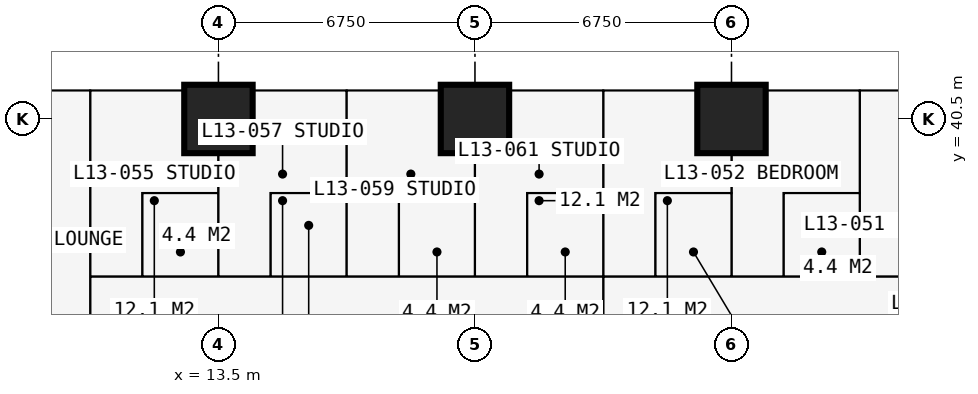
"""IFC4 building model, lengths in metres.
Left out: names, types, materials, properties, quantities, classifications, styles, units other than length and angle.
Written with IfcOpenShell. Run it as: python <this file> out.ifc"""

import sys

from ifc_helpers import new_model, si_unit, direction, frame, frame_2d, origin, origin_2d, place, context, subcontext, project, spatial, rectangle, extrude, element, fill, save


model = new_model("IFC4")
c1 = context("Model", 3, precision=1e-05, world=origin(), true_north=direction((0.0, 1.0)))
c2 = subcontext(c1, "Body", "Model", "MODEL_VIEW")
j1 = project(units=[si_unit("LENGTHUNIT", "METRE"), si_unit("PLANEANGLEUNIT", "RADIAN")], contexts=[c1])
p1 = place(None, origin())
s1 = spatial("IfcSite", under=j1, at=p1, CompositionType="ELEMENT")
p2 = place(p1, origin())
s2 = spatial("IfcBuilding", under=s1, at=p2, CompositionType="ELEMENT")
p3 = place(p2, frame((0.0, 0.0, 50.4)))
s3 = spatial("IfcBuildingStorey", under=s2, at=p3, CompositionType="ELEMENT", Elevation=50.4)
for number, where, z_axis, x_axis in (
    (1, (13.5, 40.5, 0.0), (0.0, 0.0, 1.0), (1.0, 0.0, 0.0)),
    (2, (20.25, 40.5, 0.0), (0.0, 0.0, 1.0), (1.0, 0.0, 0.0)),
    (3, (27.0, 40.5, 0.0), (0.0, 0.0, 1.0), (1.0, 0.0, 0.0)),
):
    element("IfcColumn", number, at=place(p3, frame(where, z_axis=z_axis, x_axis=x_axis)), inside=s3, PredefinedType="COLUMN", context=c2, shape_type="SweptSolid", body=[
        extrude(rectangle(XDim=1.8, YDim=1.8, at=origin_2d()), origin(), (0.0, 0.0, 1.0), 3.6),
    ])
p4 = place(p3, frame((20.25, 41.25, 0.0), z_axis=(0.0, 0.0, 1.0), x_axis=(1.0, 0.0, 0.0)))
e4 = element("IfcWall", 4, at=p4, inside=s3, PredefinedType="SOLIDWALL", context=c2, shape_type="SweptSolid", body=[
    extrude(rectangle(XDim=6.75, YDim=0.15, at=frame_2d((3.375, 0.0))), origin(), (0.0, 0.0, 1.0), 3.375),
])
p5 = place(p4, frame((0.962, 0.0, 0.0)))
e5 = element("IfcOpeningElement", 5, at=p5, cuts=e4, PredefinedType="OPENING", context=c2, shape_type="SweptSolid", body=[
    extrude(rectangle(XDim=1.0, YDim=2.2, at=frame_2d((0.5, 1.1))), frame((0.0, 0.085, 0.0), z_axis=(0.0, -1.0, 0.0), x_axis=(1.0, 0.0, 0.0)), (0.0, 0.0, 1.0), 0.17),
])
p6 = place(p4, frame((2.025, 0.0, 0.9)))
e6 = element("IfcOpeningElement", 6, at=p6, cuts=e4, PredefinedType="OPENING", context=c2, shape_type="SweptSolid", body=[
    extrude(rectangle(XDim=1.2, YDim=1.8, at=frame_2d((0.6, 0.9))), frame((0.0, 0.085, 0.0), z_axis=(0.0, -1.0, 0.0), x_axis=(1.0, 0.0, 0.0)), (0.0, 0.0, 1.0), 0.17),
])
p7 = place(p4, frame((4.788, 0.0, 0.0)))
e7 = element("IfcOpeningElement", 7, at=p7, cuts=e4, PredefinedType="OPENING", context=c2, shape_type="SweptSolid", body=[
    extrude(rectangle(XDim=1.0, YDim=2.2, at=frame_2d((0.5, 1.1))), frame((0.0, 0.085, 0.0), z_axis=(0.0, -1.0, 0.0), x_axis=(1.0, 0.0, 0.0)), (0.0, 0.0, 1.0), 0.17),
])
p8 = place(p4, frame((3.525, 0.0, 0.9)))
e8 = element("IfcOpeningElement", 8, at=p8, cuts=e4, PredefinedType="OPENING", context=c2, shape_type="SweptSolid", body=[
    extrude(rectangle(XDim=1.2, YDim=1.8, at=frame_2d((0.6, 0.9))), frame((0.0, 0.085, 0.0), z_axis=(0.0, -1.0, 0.0), x_axis=(1.0, 0.0, 0.0)), (0.0, 0.0, 1.0), 0.17),
])
p9 = place(p3, frame((23.625, 41.35, 0.0), z_axis=(0.0, 0.0, 1.0), x_axis=(0.0, 1.0, 0.0)))
e9 = element("IfcWall", 9, at=p9, inside=s3, PredefinedType="USERDEFINED", context=c2, shape_type="SweptSolid", body=[
    extrude(rectangle(XDim=2.2, YDim=1.0, at=frame_2d((1.1, 0.0))), origin(), (0.0, 0.0, 1.0), 0.9),
])
p10 = place(p3, frame((10.125, 30.375, 0.0), z_axis=(0.0, 0.0, 1.0), x_axis=(0.0, 1.0, 0.0)))
e10 = element("IfcWall", 10, at=p10, inside=s3, PredefinedType="PARTITIONING", context=c2, shape_type="SweptSolid", body=[
    extrude(rectangle(XDim=10.859, YDim=0.15, at=frame_2d((5.429, 0.0))), origin(), (0.0, 0.0, 1.0), 3.375),
])
p11 = place(p10, frame((4.725, 0.0, 0.0)))
e11 = element("IfcOpeningElement", 11, at=p11, cuts=e10, PredefinedType="OPENING", context=c2, shape_type="SweptSolid", body=[
    extrude(rectangle(XDim=1.0, YDim=2.2, at=frame_2d((0.5, 1.1))), frame((0.0, 0.085, 0.0), z_axis=(0.0, -1.0, 0.0), x_axis=(1.0, 0.0, 0.0)), (0.0, 0.0, 1.0), 0.17),
])
p12 = place(p3, frame((10.125, 36.35, 0.0), z_axis=(0.0, 0.0, 1.0), x_axis=(1.0, 0.0, 0.0)))
e12 = element("IfcWall", 12, at=p12, inside=s3, PredefinedType="PARTITIONING", context=c2, shape_type="SweptSolid", body=[
    extrude(rectangle(XDim=23.625, YDim=0.1, at=frame_2d((11.812, 0.0))), origin(), (0.0, 0.0, 1.0), 3.375),
])
p13 = place(p12, frame((21.45, 0.0, 0.0)))
e13 = element("IfcOpeningElement", 13, at=p13, cuts=e12, PredefinedType="OPENING", context=c2, shape_type="SweptSolid", body=[
    extrude(rectangle(XDim=1.0, YDim=2.2, at=frame_2d((0.5, 1.1))), frame((0.0, 0.06, 0.0), z_axis=(0.0, -1.0, 0.0), x_axis=(1.0, 0.0, 0.0)), (0.0, 0.0, 1.0), 0.12),
])
p14 = place(p12, frame((17.125, 0.0, 0.0)))
e14 = element("IfcOpeningElement", 14, at=p14, cuts=e12, PredefinedType="OPENING", context=c2, shape_type="SweptSolid", body=[
    extrude(rectangle(XDim=0.95, YDim=2.2, at=frame_2d((0.475, 1.1))), frame((0.0, 0.06, 0.0), z_axis=(0.0, -1.0, 0.0), x_axis=(1.0, 0.0, 0.0)), (0.0, 0.0, 1.0), 0.12),
])
p15 = place(p12, frame((13.7, 0.0, 0.0)))
e15 = element("IfcOpeningElement", 15, at=p15, cuts=e12, PredefinedType="OPENING", context=c2, shape_type="SweptSolid", body=[
    extrude(rectangle(XDim=0.95, YDim=2.2, at=frame_2d((0.475, 1.1))), frame((0.0, 0.06, 0.0), z_axis=(0.0, -1.0, 0.0), x_axis=(1.0, 0.0, 0.0)), (0.0, 0.0, 1.0), 0.12),
])
p16 = place(p12, frame((0.2, 0.0, 0.0)))
e16 = element("IfcOpeningElement", 16, at=p16, cuts=e12, PredefinedType="OPENING", context=c2, shape_type="SweptSolid", body=[
    extrude(rectangle(XDim=0.95, YDim=2.2, at=frame_2d((0.475, 1.1))), frame((0.0, 0.06, 0.0), z_axis=(0.0, -1.0, 0.0), x_axis=(1.0, 0.0, 0.0)), (0.0, 0.0, 1.0), 0.12),
])
p17 = place(p12, frame((3.625, 0.0, 0.0)))
e17 = element("IfcOpeningElement", 17, at=p17, cuts=e12, PredefinedType="OPENING", context=c2, shape_type="SweptSolid", body=[
    extrude(rectangle(XDim=0.95, YDim=2.2, at=frame_2d((0.475, 1.1))), frame((0.0, 0.06, 0.0), z_axis=(0.0, -1.0, 0.0), x_axis=(1.0, 0.0, 0.0)), (0.0, 0.0, 1.0), 0.12),
])
p18 = place(p12, frame((7.0, 0.0, 0.0)))
e18 = element("IfcOpeningElement", 18, at=p18, cuts=e12, PredefinedType="OPENING", context=c2, shape_type="SweptSolid", body=[
    extrude(rectangle(XDim=0.95, YDim=2.2, at=frame_2d((0.475, 1.1))), frame((0.0, 0.06, 0.0), z_axis=(0.0, -1.0, 0.0), x_axis=(1.0, 0.0, 0.0)), (0.0, 0.0, 1.0), 0.12),
])
p19 = place(p12, frame((10.375, 0.0, 0.0)))
e19 = element("IfcOpeningElement", 19, at=p19, cuts=e12, PredefinedType="OPENING", context=c2, shape_type="SweptSolid", body=[
    extrude(rectangle(XDim=0.95, YDim=2.2, at=frame_2d((0.475, 1.1))), frame((0.0, 0.06, 0.0), z_axis=(0.0, -1.0, 0.0), x_axis=(1.0, 0.0, 0.0)), (0.0, 0.0, 1.0), 0.12),
])
p20 = place(p3, frame((11.5, 36.35, 0.0), z_axis=(0.0, 0.0, 1.0), x_axis=(0.0, 1.0, 0.0)))
e20 = element("IfcWall", 20, at=p20, inside=s3, PredefinedType="PARTITIONING", context=c2, shape_type="SweptSolid", body=[
    extrude(rectangle(XDim=2.2, YDim=0.1, at=frame_2d((1.1, 0.0))), origin(), (0.0, 0.0, 1.0), 3.375),
])
p21 = place(p20, frame((0.65, 0.0, 0.0)))
e21 = element("IfcOpeningElement", 21, at=p21, cuts=e20, PredefinedType="OPENING", context=c2, shape_type="SweptSolid", body=[
    extrude(rectangle(XDim=0.9, YDim=2.2, at=frame_2d((0.45, 1.1))), frame((0.0, 0.06, 0.0), z_axis=(0.0, -1.0, 0.0), x_axis=(1.0, 0.0, 0.0)), (0.0, 0.0, 1.0), 0.12),
])
p22 = place(p3, frame((11.5, 38.55, 0.0), z_axis=(0.0, 0.0, 1.0), x_axis=(1.0, 0.0, 0.0)))
e22 = element("IfcWall", 22, at=p22, inside=s3, PredefinedType="PARTITIONING", context=c2, shape_type="SweptSolid", body=[
    extrude(rectangle(XDim=2.0, YDim=0.1, at=frame_2d((1.0, 0.0))), origin(), (0.0, 0.0, 1.0), 3.375),
])
p23 = place(p3, frame((13.5, 36.35, 0.0), z_axis=(0.0, 0.0, 1.0), x_axis=(0.0, 1.0, 0.0)))
e23 = element("IfcWall", 23, at=p23, inside=s3, PredefinedType="PARTITIONING", context=c2, shape_type="SweptSolid", body=[
    extrude(rectangle(XDim=4.884, YDim=0.175, at=frame_2d((2.442, 0.0))), origin(), (0.0, 0.0, 1.0), 2.61),
])
p24 = place(p3, frame((14.875, 36.35, 0.0), z_axis=(0.0, 0.0, 1.0), x_axis=(0.0, 1.0, 0.0)))
e24 = element("IfcWall", 24, at=p24, inside=s3, PredefinedType="PARTITIONING", context=c2, shape_type="SweptSolid", body=[
    extrude(rectangle(XDim=2.2, YDim=0.1, at=frame_2d((1.1, 0.0))), origin(), (0.0, 0.0, 1.0), 3.375),
])
p25 = place(p24, frame((0.65, 0.0, 0.0)))
e25 = element("IfcOpeningElement", 25, at=p25, cuts=e24, PredefinedType="OPENING", context=c2, shape_type="SweptSolid", body=[
    extrude(rectangle(XDim=0.9, YDim=2.2, at=frame_2d((0.45, 1.1))), frame((0.0, 0.06, 0.0), z_axis=(0.0, -1.0, 0.0), x_axis=(1.0, 0.0, 0.0)), (0.0, 0.0, 1.0), 0.12),
])
p26 = place(p3, frame((14.875, 38.55, 0.0), z_axis=(0.0, 0.0, 1.0), x_axis=(1.0, 0.0, 0.0)))
e26 = element("IfcWall", 26, at=p26, inside=s3, PredefinedType="PARTITIONING", context=c2, shape_type="SweptSolid", body=[
    extrude(rectangle(XDim=2.0, YDim=0.1, at=frame_2d((1.0, 0.0))), origin(), (0.0, 0.0, 1.0), 3.375),
])
p27 = place(p3, frame((16.875, 36.35, 0.0), z_axis=(0.0, 0.0, 1.0), x_axis=(0.0, 1.0, 0.0)))
e27 = element("IfcWall", 27, at=p27, inside=s3, PredefinedType="PARTITIONING", context=c2, shape_type="SweptSolid", body=[
    extrude(rectangle(XDim=4.884, YDim=0.175, at=frame_2d((2.442, 0.0))), origin(), (0.0, 0.0, 1.0), 3.375),
])
p28 = place(p3, frame((18.25, 36.35, 0.0), z_axis=(0.0, 0.0, 1.0), x_axis=(0.0, 1.0, 0.0)))
e28 = element("IfcWall", 28, at=p28, inside=s3, PredefinedType="PARTITIONING", context=c2, shape_type="SweptSolid", body=[
    extrude(rectangle(XDim=2.2, YDim=0.1, at=frame_2d((1.1, 0.0))), origin(), (0.0, 0.0, 1.0), 3.375),
])
p29 = place(p28, frame((0.65, 0.0, 0.0)))
e29 = element("IfcOpeningElement", 29, at=p29, cuts=e28, PredefinedType="OPENING", context=c2, shape_type="SweptSolid", body=[
    extrude(rectangle(XDim=0.9, YDim=2.2, at=frame_2d((0.45, 1.1))), frame((0.0, 0.06, 0.0), z_axis=(0.0, -1.0, 0.0), x_axis=(1.0, 0.0, 0.0)), (0.0, 0.0, 1.0), 0.12),
])
p30 = place(p3, frame((18.25, 38.55, 0.0), z_axis=(0.0, 0.0, 1.0), x_axis=(1.0, 0.0, 0.0)))
e30 = element("IfcWall", 30, at=p30, inside=s3, PredefinedType="PARTITIONING", context=c2, shape_type="SweptSolid", body=[
    extrude(rectangle(XDim=2.0, YDim=0.1, at=frame_2d((1.0, 0.0))), origin(), (0.0, 0.0, 1.0), 3.375),
])
p31 = place(p3, frame((20.25, 36.35, 0.0), z_axis=(0.0, 0.0, 1.0), x_axis=(0.0, 1.0, 0.0)))
e31 = element("IfcWall", 31, at=p31, inside=s3, PredefinedType="PARTITIONING", context=c2, shape_type="SweptSolid", body=[
    extrude(rectangle(XDim=4.884, YDim=0.175, at=frame_2d((2.442, 0.0))), origin(), (0.0, 0.0, 1.0), 2.61),
])
p32 = place(p3, frame((21.625, 36.35, 0.0), z_axis=(0.0, 0.0, 1.0), x_axis=(0.0, 1.0, 0.0)))
e32 = element("IfcWall", 32, at=p32, inside=s3, PredefinedType="PARTITIONING", context=c2, shape_type="SweptSolid", body=[
    extrude(rectangle(XDim=2.2, YDim=0.1, at=frame_2d((1.1, 0.0))), origin(), (0.0, 0.0, 1.0), 3.375),
])
p33 = place(p32, frame((0.65, 0.0, 0.0)))
e33 = element("IfcOpeningElement", 33, at=p33, cuts=e32, PredefinedType="OPENING", context=c2, shape_type="SweptSolid", body=[
    extrude(rectangle(XDim=0.9, YDim=2.2, at=frame_2d((0.45, 1.1))), frame((0.0, 0.06, 0.0), z_axis=(0.0, -1.0, 0.0), x_axis=(1.0, 0.0, 0.0)), (0.0, 0.0, 1.0), 0.12),
])
p34 = place(p3, frame((21.625, 38.55, 0.0), z_axis=(0.0, 0.0, 1.0), x_axis=(1.0, 0.0, 0.0)))
e34 = element("IfcWall", 34, at=p34, inside=s3, PredefinedType="PARTITIONING", context=c2, shape_type="SweptSolid", body=[
    extrude(rectangle(XDim=2.0, YDim=0.1, at=frame_2d((1.0, 0.0))), origin(), (0.0, 0.0, 1.0), 3.375),
])
p35 = place(p3, frame((23.625, 29.2, 0.0), z_axis=(0.0, 0.0, 1.0), x_axis=(0.0, 1.0, 0.0)))
e35 = element("IfcWall", 35, at=p35, inside=s3, PredefinedType="PARTITIONING", context=c2, shape_type="SweptSolid", body=[
    extrude(rectangle(XDim=12.034, YDim=0.15, at=frame_2d((6.017, 0.0))), origin(), (0.0, 0.0, 1.0), 3.375),
])
p36 = place(p3, frame((25.0, 36.35, 0.0), z_axis=(0.0, 0.0, 1.0), x_axis=(0.0, 1.0, 0.0)))
e36 = element("IfcWall", 36, at=p36, inside=s3, PredefinedType="PARTITIONING", context=c2, shape_type="SweptSolid", body=[
    extrude(rectangle(XDim=2.2, YDim=0.1, at=frame_2d((1.1, 0.0))), origin(), (0.0, 0.0, 1.0), 3.375),
])
p37 = place(p3, frame((25.0, 38.55, 0.0), z_axis=(0.0, 0.0, 1.0), x_axis=(1.0, 0.0, 0.0)))
e37 = element("IfcWall", 37, at=p37, inside=s3, PredefinedType="PARTITIONING", context=c2, shape_type="SweptSolid", body=[
    extrude(rectangle(XDim=2.0, YDim=0.1, at=frame_2d((1.0, 0.0))), origin(), (0.0, 0.0, 1.0), 3.375),
])
p38 = place(p3, frame((27.0, 36.35, 0.0), z_axis=(0.0, 0.0, 1.0), x_axis=(0.0, 1.0, 0.0)))
e38 = element("IfcWall", 38, at=p38, inside=s3, PredefinedType="PARTITIONING", context=c2, shape_type="SweptSolid", body=[
    extrude(rectangle(XDim=4.884, YDim=0.175, at=frame_2d((2.442, 0.0))), origin(), (0.0, 0.0, 1.0), 2.877),
])
p39 = place(p38, frame((0.65, 0.0, 0.0)))
e39 = element("IfcOpeningElement", 39, at=p39, cuts=e38, PredefinedType="OPENING", context=c2, shape_type="SweptSolid", body=[
    extrude(rectangle(XDim=0.9, YDim=2.2, at=frame_2d((0.45, 1.1))), frame((0.0, 0.097, 0.0), z_axis=(0.0, -1.0, 0.0), x_axis=(1.0, 0.0, 0.0)), (0.0, 0.0, 1.0), 0.195),
])
p40 = place(p3, frame((28.375, 36.35, 0.0), z_axis=(0.0, 0.0, 1.0), x_axis=(0.0, 1.0, 0.0)))
e40 = element("IfcWall", 40, at=p40, inside=s3, PredefinedType="PARTITIONING", context=c2, shape_type="SweptSolid", body=[
    extrude(rectangle(XDim=2.2, YDim=0.1, at=frame_2d((1.1, 0.0))), origin(), (0.0, 0.0, 1.0), 3.375),
])
p41 = place(p40, frame((0.65, 0.0, 0.0)))
e41 = element("IfcOpeningElement", 41, at=p41, cuts=e40, PredefinedType="OPENING", context=c2, shape_type="SweptSolid", body=[
    extrude(rectangle(XDim=0.9, YDim=2.2, at=frame_2d((0.45, 1.1))), frame((0.0, 0.06, 0.0), z_axis=(0.0, -1.0, 0.0), x_axis=(1.0, 0.0, 0.0)), (0.0, 0.0, 1.0), 0.12),
])
p42 = place(p3, frame((28.375, 38.55, 0.0), z_axis=(0.0, 0.0, 1.0), x_axis=(1.0, 0.0, 0.0)))
e42 = element("IfcWall", 42, at=p42, inside=s3, PredefinedType="PARTITIONING", context=c2, shape_type="SweptSolid", body=[
    extrude(rectangle(XDim=2.0, YDim=0.1, at=frame_2d((1.0, 0.0))), origin(), (0.0, 0.0, 1.0), 3.375),
])
p43 = place(p3, frame((30.375, 36.35, 0.0), z_axis=(0.0, 0.0, 1.0), x_axis=(0.0, 1.0, 0.0)))
e43 = element("IfcWall", 43, at=p43, inside=s3, PredefinedType="PARTITIONING", context=c2, shape_type="SweptSolid", body=[
    extrude(rectangle(XDim=4.884, YDim=0.15, at=frame_2d((2.442, 0.0))), origin(), (0.0, 0.0, 1.0), 3.375),
])
p44 = place(p5, origin())
e44 = element("IfcDoor", 44, at=p44, inside=s3, OperationType="SINGLE_SWING_LEFT", PredefinedType="DOOR", context=c2, shape_type="SweptSolid", body=[
    extrude(rectangle(XDim=1.0, YDim=2.2, at=frame_2d((0.5, 1.1))), frame((0.0, 0.025, 0.0), z_axis=(0.0, -1.0, 0.0), x_axis=(1.0, 0.0, 0.0)), (0.0, 0.0, 1.0), 0.05),
])
fill(e5, e44)
p45 = place(p6, origin())
e45 = element("IfcWindow", 45, at=p45, inside=s3, PartitioningType="SINGLE_PANEL", PredefinedType="WINDOW", context=c2, shape_type="SweptSolid", body=[
    extrude(rectangle(XDim=1.2, YDim=1.8, at=frame_2d((0.6, 0.9))), frame((0.0, 0.03, 0.0), z_axis=(0.0, -1.0, 0.0), x_axis=(1.0, 0.0, 0.0)), (0.0, 0.0, 1.0), 0.06),
])
fill(e6, e45)
p46 = place(p7, origin())
e46 = element("IfcDoor", 46, at=p46, inside=s3, OperationType="SINGLE_SWING_RIGHT", PredefinedType="DOOR", context=c2, shape_type="SweptSolid", body=[
    extrude(rectangle(XDim=1.0, YDim=2.2, at=frame_2d((0.5, 1.1))), frame((0.0, 0.025, 0.0), z_axis=(0.0, -1.0, 0.0), x_axis=(1.0, 0.0, 0.0)), (0.0, 0.0, 1.0), 0.05),
])
fill(e7, e46)
p47 = place(p8, origin())
e47 = element("IfcWindow", 47, at=p47, inside=s3, PartitioningType="SINGLE_PANEL", PredefinedType="WINDOW", context=c2, shape_type="SweptSolid", body=[
    extrude(rectangle(XDim=1.2, YDim=1.8, at=frame_2d((0.6, 0.9))), frame((0.0, 0.03, 0.0), z_axis=(0.0, -1.0, 0.0), x_axis=(1.0, 0.0, 0.0)), (0.0, 0.0, 1.0), 0.06),
])
fill(e8, e47)
p48 = place(p14, origin())
e48 = element("IfcDoor", 48, at=p48, inside=s3, OperationType="SINGLE_SWING_LEFT", PredefinedType="DOOR", context=c2, shape_type="SweptSolid", body=[
    extrude(rectangle(XDim=0.95, YDim=2.2, at=frame_2d((0.475, 1.1))), frame((0.0, 0.025, 0.0), z_axis=(0.0, -1.0, 0.0), x_axis=(1.0, 0.0, 0.0)), (0.0, 0.0, 1.0), 0.05),
])
fill(e14, e48)
p49 = place(p41, origin())
e49 = element("IfcDoor", 49, at=p49, inside=s3, OperationType="SINGLE_SWING_RIGHT", PredefinedType="DOOR", context=c2, shape_type="SweptSolid", body=[
    extrude(rectangle(XDim=0.9, YDim=2.2, at=frame_2d((0.45, 1.1))), frame((0.0, 0.025, 0.0), z_axis=(0.0, -1.0, 0.0), x_axis=(1.0, 0.0, 0.0)), (0.0, 0.0, 1.0), 0.05),
])
fill(e41, e49)
p50 = place(p15, origin())
e50 = element("IfcDoor", 50, at=p50, inside=s3, OperationType="SINGLE_SWING_LEFT", PredefinedType="DOOR", context=c2, shape_type="SweptSolid", body=[
    extrude(rectangle(XDim=0.95, YDim=2.2, at=frame_2d((0.475, 1.1))), frame((0.0, 0.025, 0.0), z_axis=(0.0, -1.0, 0.0), x_axis=(1.0, 0.0, 0.0)), (0.0, 0.0, 1.0), 0.05),
])
fill(e15, e50)
p51 = place(p39, origin())
e51 = element("IfcDoor", 51, at=p51, inside=s3, OperationType="SINGLE_SWING_RIGHT", PredefinedType="DOOR", context=c2, shape_type="SweptSolid", body=[
    extrude(rectangle(XDim=0.9, YDim=2.2, at=frame_2d((0.45, 1.1))), frame((0.0, 0.025, 0.0), z_axis=(0.0, -1.0, 0.0), x_axis=(1.0, 0.0, 0.0)), (0.0, 0.0, 1.0), 0.05),
])
fill(e39, e51)
p52 = place(p16, origin())
e52 = element("IfcDoor", 52, at=p52, inside=s3, OperationType="SINGLE_SWING_LEFT", PredefinedType="DOOR", context=c2, shape_type="SweptSolid", body=[
    extrude(rectangle(XDim=0.95, YDim=2.2, at=frame_2d((0.475, 1.1))), frame((0.0, 0.025, 0.0), z_axis=(0.0, -1.0, 0.0), x_axis=(1.0, 0.0, 0.0)), (0.0, 0.0, 1.0), 0.05),
])
fill(e16, e52)
p53 = place(p21, origin())
e53 = element("IfcDoor", 53, at=p53, inside=s3, OperationType="SINGLE_SWING_RIGHT", PredefinedType="DOOR", context=c2, shape_type="SweptSolid", body=[
    extrude(rectangle(XDim=0.9, YDim=2.2, at=frame_2d((0.45, 1.1))), frame((0.0, 0.025, 0.0), z_axis=(0.0, -1.0, 0.0), x_axis=(1.0, 0.0, 0.0)), (0.0, 0.0, 1.0), 0.05),
])
fill(e21, e53)
p54 = place(p17, origin())
e54 = element("IfcDoor", 54, at=p54, inside=s3, OperationType="SINGLE_SWING_LEFT", PredefinedType="DOOR", context=c2, shape_type="SweptSolid", body=[
    extrude(rectangle(XDim=0.95, YDim=2.2, at=frame_2d((0.475, 1.1))), frame((0.0, 0.025, 0.0), z_axis=(0.0, -1.0, 0.0), x_axis=(1.0, 0.0, 0.0)), (0.0, 0.0, 1.0), 0.05),
])
fill(e17, e54)
p55 = place(p25, origin())
e55 = element("IfcDoor", 55, at=p55, inside=s3, OperationType="SINGLE_SWING_RIGHT", PredefinedType="DOOR", context=c2, shape_type="SweptSolid", body=[
    extrude(rectangle(XDim=0.9, YDim=2.2, at=frame_2d((0.45, 1.1))), frame((0.0, 0.025, 0.0), z_axis=(0.0, -1.0, 0.0), x_axis=(1.0, 0.0, 0.0)), (0.0, 0.0, 1.0), 0.05),
])
fill(e25, e55)
p56 = place(p18, origin())
e56 = element("IfcDoor", 56, at=p56, inside=s3, OperationType="SINGLE_SWING_LEFT", PredefinedType="DOOR", context=c2, shape_type="SweptSolid", body=[
    extrude(rectangle(XDim=0.95, YDim=2.2, at=frame_2d((0.475, 1.1))), frame((0.0, 0.025, 0.0), z_axis=(0.0, -1.0, 0.0), x_axis=(1.0, 0.0, 0.0)), (0.0, 0.0, 1.0), 0.05),
])
fill(e18, e56)
p57 = place(p29, origin())
e57 = element("IfcDoor", 57, at=p57, inside=s3, OperationType="SINGLE_SWING_RIGHT", PredefinedType="DOOR", context=c2, shape_type="SweptSolid", body=[
    extrude(rectangle(XDim=0.9, YDim=2.2, at=frame_2d((0.45, 1.1))), frame((0.0, 0.025, 0.0), z_axis=(0.0, -1.0, 0.0), x_axis=(1.0, 0.0, 0.0)), (0.0, 0.0, 1.0), 0.05),
])
fill(e29, e57)
p58 = place(p19, origin())
e58 = element("IfcDoor", 58, at=p58, inside=s3, OperationType="SINGLE_SWING_LEFT", PredefinedType="DOOR", context=c2, shape_type="SweptSolid", body=[
    extrude(rectangle(XDim=0.95, YDim=2.2, at=frame_2d((0.475, 1.1))), frame((0.0, 0.025, 0.0), z_axis=(0.0, -1.0, 0.0), x_axis=(1.0, 0.0, 0.0)), (0.0, 0.0, 1.0), 0.05),
])
fill(e19, e58)
p59 = place(p33, origin())
e59 = element("IfcDoor", 59, at=p59, inside=s3, OperationType="SINGLE_SWING_RIGHT", PredefinedType="DOOR", context=c2, shape_type="SweptSolid", body=[
    extrude(rectangle(XDim=0.9, YDim=2.2, at=frame_2d((0.45, 1.1))), frame((0.0, 0.025, 0.0), z_axis=(0.0, -1.0, 0.0), x_axis=(1.0, 0.0, 0.0)), (0.0, 0.0, 1.0), 0.05),
])
fill(e33, e59)
p60 = place(p11, origin())
e60 = element("IfcDoor", 60, at=p60, inside=s3, OperationType="SINGLE_SWING_LEFT", PredefinedType="DOOR", context=c2, shape_type="SweptSolid", body=[
    extrude(rectangle(XDim=1.0, YDim=2.2, at=frame_2d((0.5, 1.1))), frame((0.0, 0.025, 0.0), z_axis=(0.0, -1.0, 0.0), x_axis=(1.0, 0.0, 0.0)), (0.0, 0.0, 1.0), 0.05),
])
fill(e11, e60)
save(model, sys.argv[1])
